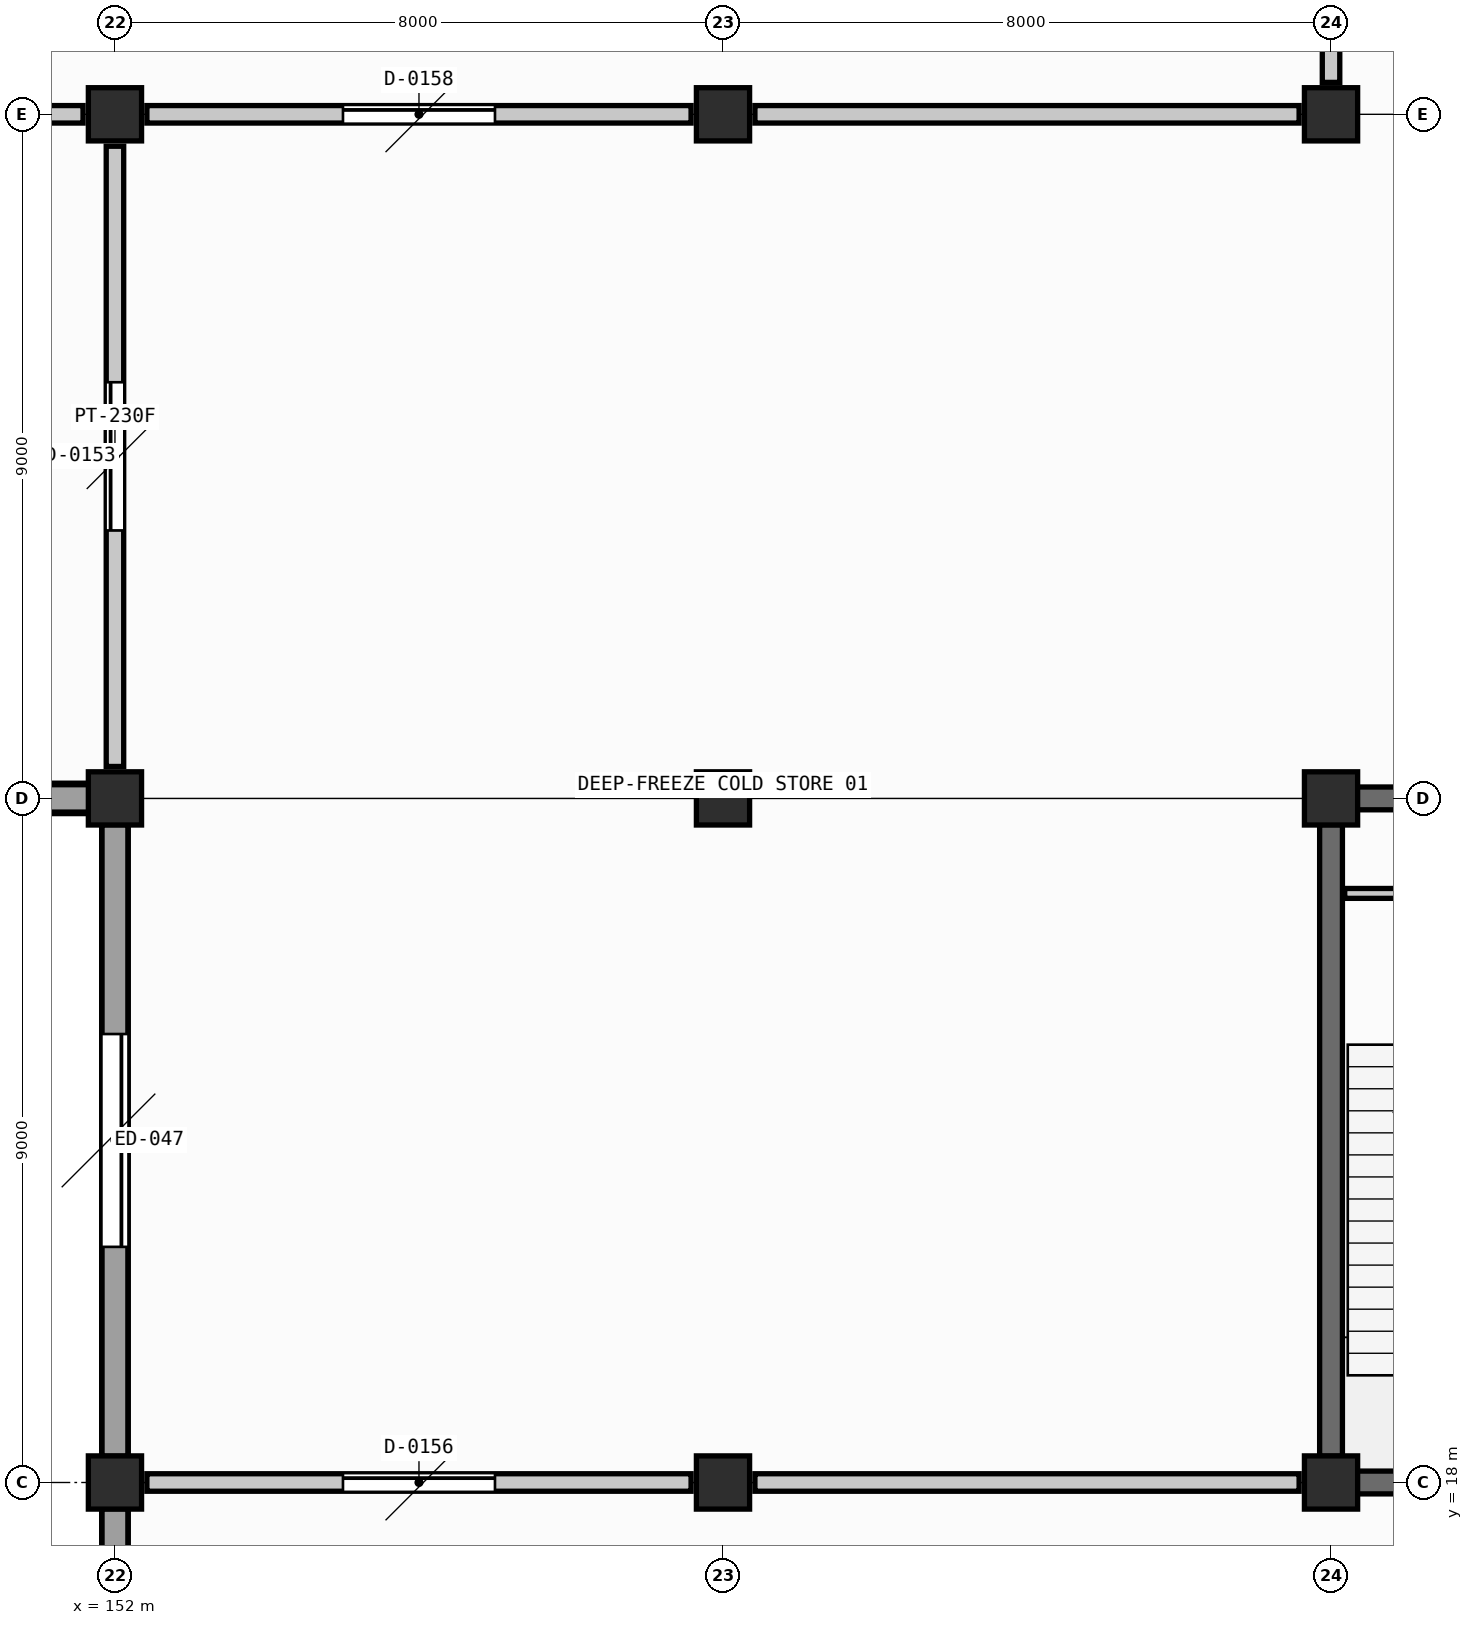
"""IFC4 building model, lengths in metres.
Left out: names, types, materials, properties, quantities, classifications, styles, units other than length and angle.
Written with IfcOpenShell. Run it as: python <this file> out.ifc"""

import sys

from ifc_helpers import new_model, si_unit, direction, frame, frame_2d, origin, origin_2d, place, context, subcontext, project, spatial, rectangle, extrude, element, fill, save


model = new_model("IFC4")
c1 = context("Model", 3, precision=1e-05, world=origin(), true_north=direction((0.0, 1.0)))
c2 = subcontext(c1, "Body", "Model", "MODEL_VIEW")
j1 = project(units=[si_unit("LENGTHUNIT", "METRE"), si_unit("PLANEANGLEUNIT", "RADIAN")], contexts=[c1])
p1 = place(None, origin())
s1 = spatial("IfcSite", under=j1, at=p1, CompositionType="ELEMENT")
p2 = place(p1, origin())
s2 = spatial("IfcBuilding", under=s1, at=p2, CompositionType="ELEMENT")
p3 = place(p2, origin())
s3 = spatial("IfcBuildingStorey", under=s2, at=p3, CompositionType="ELEMENT", Elevation=0.0)
p4 = place(p3, frame((128.4, 27.0, -1.25), z_axis=(0.0, 0.0, 1.0), x_axis=(1.0, 0.0, 0.0)))
e1 = element("IfcWall", 1, at=p4, inside=s3, PredefinedType="STANDARD", context=c2, shape_type="SweptSolid", body=[
    extrude(rectangle(XDim=23.6, YDim=0.4, at=frame_2d((11.8, 0.0))), origin(), (0.0, 0.0, 1.0), 0.9),
])
p5 = place(p3, frame((152.0, 0.0, -1.25), z_axis=(0.0, 0.0, 1.0), x_axis=(0.0, 1.0, 0.0)))
e2 = element("IfcWall", 2, at=p5, inside=s3, PredefinedType="STANDARD", context=c2, shape_type="SweptSolid", body=[
    extrude(rectangle(XDim=27.0, YDim=0.35, at=frame_2d((13.5, 0.0))), origin(), (0.0, 0.0, 1.0), 0.9),
])
for number, where, z_axis, x_axis in (
    (3, (152.0, 18.0, -1.25), (0.0, 0.0, 1.0), (1.0, 0.0, 0.0)),
    (4, (152.0, 27.0, -1.25), (0.0, 0.0, 1.0), (1.0, 0.0, 0.0)),
    (5, (152.0, 36.0, -1.25), (0.0, 0.0, 1.0), (1.0, 0.0, 0.0)),
    (6, (160.0, 18.0, -1.25), (0.0, 0.0, 1.0), (1.0, 0.0, 0.0)),
    (7, (160.0, 27.0, -1.25), (0.0, 0.0, 1.0), (1.0, 0.0, 0.0)),
    (8, (160.0, 36.0, -1.25), (0.0, 0.0, 1.0), (1.0, 0.0, 0.0)),
    (9, (168.0, 18.0, -1.25), (0.0, 0.0, 1.0), (1.0, 0.0, 0.0)),
    (10, (168.0, 27.0, -1.25), (0.0, 0.0, 1.0), (1.0, 0.0, 0.0)),
    (11, (168.0, 36.0, -1.25), (0.0, 0.0, 1.0), (1.0, 0.0, 0.0)),
):
    element("IfcColumn", number, at=place(p3, frame(where, z_axis=z_axis, x_axis=x_axis)), inside=s3, PredefinedType="COLUMN", context=c2, shape_type="SweptSolid", body=[
        extrude(rectangle(XDim=0.7, YDim=0.7, at=origin_2d()), origin(), (0.0, 0.0, 1.0), 6.05),
    ])
p6 = place(p3, frame((144.345, 27.0, 0.0), z_axis=(0.0, 0.0, 1.0), x_axis=(1.0, 0.0, 0.0)))
e12 = element("IfcWall", 12, at=p6, inside=s3, PredefinedType="SOLIDWALL", context=c2, shape_type="SweptSolid", body=[
    extrude(rectangle(XDim=7.31, YDim=0.36, at=frame_2d((3.655, 0.0))), origin(), (0.0, 0.0, 1.0), 3.55),
])
p7 = place(p6, frame((2.155, 0.0, 0.0)))
e13 = element("IfcOpeningElement", 13, at=p7, cuts=e12, PredefinedType="OPENING", context=c2, shape_type="SweptSolid", body=[
    extrude(rectangle(XDim=3.0, YDim=3.2, at=frame_2d((1.5, 1.6))), frame((0.0, 0.19, 0.0), z_axis=(0.0, -1.0, 0.0), x_axis=(1.0, 0.0, 0.0)), (0.0, 0.0, 1.0), 0.38),
])
p8 = place(p3, frame((152.0, 17.655, 0.0), z_axis=(0.0, 0.0, 1.0), x_axis=(0.0, -1.0, 0.0)))
e14 = element("IfcWall", 14, at=p8, inside=s3, PredefinedType="SOLIDWALL", context=c2, shape_type="SweptSolid", body=[
    extrude(rectangle(XDim=8.31, YDim=0.34, at=frame_2d((4.155, 0.0))), origin(), (0.0, 0.0, 1.0), 3.65),
])
p9 = place(p8, frame((2.755, 0.0, 0.0)))
e15 = element("IfcOpeningElement", 15, at=p9, cuts=e14, PredefinedType="OPENING", context=c2, shape_type="SweptSolid", body=[
    extrude(rectangle(XDim=2.8, YDim=3.0, at=frame_2d((1.4, 1.5))), frame((0.0, 0.18, 0.0), z_axis=(0.0, -1.0, 0.0), x_axis=(1.0, 0.0, 0.0)), (0.0, 0.0, 1.0), 0.36),
])
p10 = place(p3, frame((152.0, 26.655, 0.0), z_axis=(0.0, 0.0, 1.0), x_axis=(0.0, -1.0, 0.0)))
e16 = element("IfcWall", 16, at=p10, inside=s3, PredefinedType="SOLIDWALL", context=c2, shape_type="SweptSolid", body=[
    extrude(rectangle(XDim=8.31, YDim=0.34, at=frame_2d((4.155, 0.0))), origin(), (0.0, 0.0, 1.0), 3.65),
])
p11 = place(p10, frame((2.755, 0.0, 0.0)))
e17 = element("IfcOpeningElement", 17, at=p11, cuts=e16, PredefinedType="OPENING", context=c2, shape_type="SweptSolid", body=[
    extrude(rectangle(XDim=2.8, YDim=3.0, at=frame_2d((1.4, 1.5))), frame((0.0, 0.18, 0.0), z_axis=(0.0, -1.0, 0.0), x_axis=(1.0, 0.0, 0.0)), (0.0, 0.0, 1.0), 0.36),
])
for number, where, z_axis, x_axis in (
    (18, (168.345, 18.0, -1.25), (0.0, 0.0, 1.0), (1.0, 0.0, 0.0)),
    (19, (168.345, 27.0, -1.25), (0.0, 0.0, 1.0), (1.0, 0.0, 0.0)),
):
    element("IfcWall", number, at=place(p3, frame(where, z_axis=z_axis, x_axis=x_axis)), inside=s3, PredefinedType="SHEAR", context=c2, shape_type="SweptSolid", body=[
        extrude(rectangle(XDim=7.31, YDim=0.3, at=frame_2d((3.655, 0.0))), origin(), (0.0, 0.0, 1.0), 5.755),
    ])
p12 = place(p3, frame((168.0, 18.345, -1.25), z_axis=(0.0, 0.0, 1.0), x_axis=(0.0, 1.0, 0.0)))
e20 = element("IfcWall", 20, at=p12, inside=s3, PredefinedType="SHEAR", context=c2, shape_type="SweptSolid", body=[
    extrude(rectangle(XDim=8.31, YDim=0.3, at=frame_2d((4.155, 0.0))), origin(), (0.0, 0.0, 1.0), 5.755),
])
p13 = place(p3, frame((168.18, 25.75, 0.0), z_axis=(0.0, 0.0, 1.0), x_axis=(1.0, 0.0, 0.0)))
e21 = element("IfcWall", 21, at=p13, inside=s3, PredefinedType="PARTITIONING", context=c2, shape_type="SweptSolid", body=[
    extrude(rectangle(XDim=4.28, YDim=0.13, at=frame_2d((2.14, 0.0))), origin(), (0.0, 0.0, 1.0), 3.855),
])
p14 = place(p3, frame((152.0, 27.42, 0.0), z_axis=(0.0, 0.0, 1.0), x_axis=(0.0, 1.0, 0.0)))
e22 = element("IfcWall", 22, at=p14, inside=s3, PredefinedType="PARTITIONING", context=c2, shape_type="SweptSolid", body=[
    extrude(rectangle(XDim=8.16, YDim=0.23, at=frame_2d((4.08, 0.0))), origin(), (0.0, 0.0, 1.0), 3.65),
])
p15 = place(p14, frame((3.105, 0.0, 0.0)))
e23 = element("IfcOpeningElement", 23, at=p15, cuts=e22, PredefinedType="OPENING", context=c2, shape_type="SweptSolid", body=[
    extrude(rectangle(XDim=1.95, YDim=2.45, at=frame_2d((0.975, 1.225))), frame((0.0, 0.125, 0.0), z_axis=(0.0, -1.0, 0.0), x_axis=(1.0, 0.0, 0.0)), (0.0, 0.0, 1.0), 0.25),
])
p16 = place(p3, frame((144.42, 36.0, 0.0), z_axis=(0.0, 0.0, 1.0), x_axis=(1.0, 0.0, 0.0)))
e24 = element("IfcWall", 24, at=p16, inside=s3, PredefinedType="PARTITIONING", context=c2, shape_type="SweptSolid", body=[
    extrude(rectangle(XDim=7.16, YDim=0.23, at=frame_2d((3.58, 0.0))), origin(), (0.0, 0.0, 1.0), 3.55),
])
p17 = place(p16, frame((2.605, 0.0, 0.0)))
e25 = element("IfcOpeningElement", 25, at=p17, cuts=e24, PredefinedType="OPENING", context=c2, shape_type="SweptSolid", body=[
    extrude(rectangle(XDim=1.95, YDim=2.45, at=frame_2d((0.975, 1.225))), frame((0.0, 0.125, 0.0), z_axis=(0.0, -1.0, 0.0), x_axis=(1.0, 0.0, 0.0)), (0.0, 0.0, 1.0), 0.25),
])
p18 = place(p3, frame((152.42, 18.0, 0.0), z_axis=(0.0, 0.0, 1.0), x_axis=(1.0, 0.0, 0.0)))
e26 = element("IfcWall", 26, at=p18, inside=s3, PredefinedType="PARTITIONING", context=c2, shape_type="SweptSolid", body=[
    extrude(rectangle(XDim=7.16, YDim=0.23, at=frame_2d((3.58, 0.0))), origin(), (0.0, 0.0, 1.0), 3.55),
])
p19 = place(p18, frame((2.58, 0.0, 0.0)))
e27 = element("IfcOpeningElement", 27, at=p19, cuts=e26, PredefinedType="OPENING", context=c2, shape_type="SweptSolid", body=[
    extrude(rectangle(XDim=2.0, YDim=2.5, at=frame_2d((1.0, 1.25))), frame((0.0, 0.125, 0.0), z_axis=(0.0, -1.0, 0.0), x_axis=(1.0, 0.0, 0.0)), (0.0, 0.0, 1.0), 0.25),
])
p20 = place(p3, frame((160.42, 18.0, 0.0), z_axis=(0.0, 0.0, 1.0), x_axis=(1.0, 0.0, 0.0)))
e28 = element("IfcWall", 28, at=p20, inside=s3, PredefinedType="PARTITIONING", context=c2, shape_type="SweptSolid", body=[
    extrude(rectangle(XDim=7.16, YDim=0.23, at=frame_2d((3.58, 0.0))), origin(), (0.0, 0.0, 1.0), 3.55),
])
p21 = place(p3, frame((152.42, 36.0, 0.0), z_axis=(0.0, 0.0, 1.0), x_axis=(1.0, 0.0, 0.0)))
e29 = element("IfcWall", 29, at=p21, inside=s3, PredefinedType="PARTITIONING", context=c2, shape_type="SweptSolid", body=[
    extrude(rectangle(XDim=7.16, YDim=0.23, at=frame_2d((3.58, 0.0))), origin(), (0.0, 0.0, 1.0), 3.55),
])
p22 = place(p21, frame((2.58, 0.0, 0.0)))
e30 = element("IfcOpeningElement", 30, at=p22, cuts=e29, PredefinedType="OPENING", context=c2, shape_type="SweptSolid", body=[
    extrude(rectangle(XDim=2.0, YDim=2.5, at=frame_2d((1.0, 1.25))), frame((0.0, 0.125, 0.0), z_axis=(0.0, -1.0, 0.0), x_axis=(1.0, 0.0, 0.0)), (0.0, 0.0, 1.0), 0.25),
])
p23 = place(p3, frame((160.42, 36.0, 0.0), z_axis=(0.0, 0.0, 1.0), x_axis=(1.0, 0.0, 0.0)))
e31 = element("IfcWall", 31, at=p23, inside=s3, PredefinedType="PARTITIONING", context=c2, shape_type="SweptSolid", body=[
    extrude(rectangle(XDim=7.16, YDim=0.23, at=frame_2d((3.58, 0.0))), origin(), (0.0, 0.0, 1.0), 3.55),
])
p24 = place(p3, frame((168.0, 36.42, 0.0), z_axis=(0.0, 0.0, 1.0), x_axis=(0.0, 1.0, 0.0)))
e32 = element("IfcWall", 32, at=p24, inside=s3, PredefinedType="PARTITIONING", context=c2, shape_type="SweptSolid", body=[
    extrude(rectangle(XDim=8.16, YDim=0.23, at=frame_2d((4.08, 0.0))), origin(), (0.0, 0.0, 1.0), 3.65),
])
p25 = place(p24, frame((3.08, 0.0, 0.0)))
e33 = element("IfcOpeningElement", 33, at=p25, cuts=e32, PredefinedType="OPENING", context=c2, shape_type="SweptSolid", body=[
    extrude(rectangle(XDim=2.0, YDim=2.5, at=frame_2d((1.0, 1.25))), frame((0.0, 0.125, 0.0), z_axis=(0.0, -1.0, 0.0), x_axis=(1.0, 0.0, 0.0)), (0.0, 0.0, 1.0), 0.25),
])
p26 = place(p11, origin())
e34 = element("IfcDoor", 34, at=p26, inside=s3, OperationType="ROLLINGUP", PredefinedType="GATE", context=c2, shape_type="SweptSolid", body=[
    extrude(rectangle(XDim=2.8, YDim=3.0, at=frame_2d((1.4, 1.5))), frame((0.0, 0.025, 0.0), z_axis=(0.0, -1.0, 0.0), x_axis=(1.0, 0.0, 0.0)), (0.0, 0.0, 1.0), 0.05),
])
fill(e17, e34)
p27 = place(p15, origin())
e35 = element("IfcDoor", 35, at=p27, inside=s3, OperationType="SLIDING_TO_LEFT", PredefinedType="DOOR", context=c2, shape_type="SweptSolid", body=[
    extrude(rectangle(XDim=1.95, YDim=2.45, at=frame_2d((0.975, 1.225))), frame((0.0, 0.025, 0.0), z_axis=(0.0, -1.0, 0.0), x_axis=(1.0, 0.0, 0.0)), (0.0, 0.0, 1.0), 0.05),
])
fill(e23, e35)
p28 = place(p19, origin())
e36 = element("IfcDoor", 36, at=p28, inside=s3, OperationType="SLIDING_TO_LEFT", PredefinedType="DOOR", context=c2, shape_type="SweptSolid", body=[
    extrude(rectangle(XDim=2.0, YDim=2.5, at=frame_2d((1.0, 1.25))), frame((0.0, 0.025, 0.0), z_axis=(0.0, -1.0, 0.0), x_axis=(1.0, 0.0, 0.0)), (0.0, 0.0, 1.0), 0.05),
])
fill(e27, e36)
p29 = place(p22, origin())
e37 = element("IfcDoor", 37, at=p29, inside=s3, OperationType="SLIDING_TO_LEFT", PredefinedType="DOOR", context=c2, shape_type="SweptSolid", body=[
    extrude(rectangle(XDim=2.0, YDim=2.5, at=frame_2d((1.0, 1.25))), frame((0.0, 0.025, 0.0), z_axis=(0.0, -1.0, 0.0), x_axis=(1.0, 0.0, 0.0)), (0.0, 0.0, 1.0), 0.05),
])
fill(e30, e37)
save(model, sys.argv[1])
